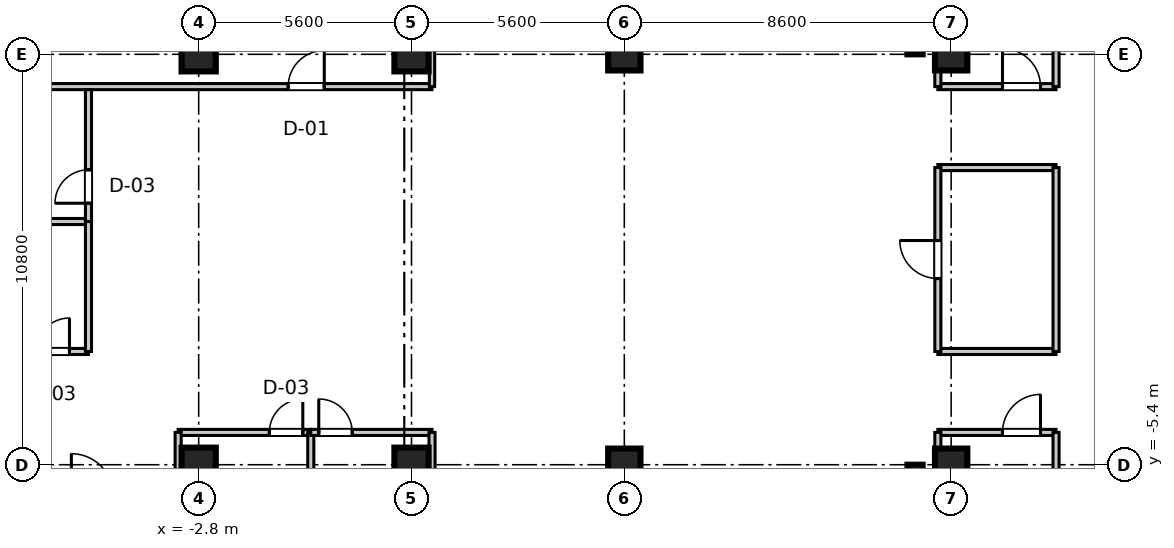
"""IFC4 building model, lengths in metres.
Left out: names, types, materials, properties, quantities, classifications, styles, units other than length and angle.
Written with IfcOpenShell. Run it as: python <this file> out.ifc"""

import sys

from ifc_helpers import new_model, si_unit, direction, frame, frame_2d, origin, origin_2d, place, context, subcontext, project, spatial, rectangle, extrude, source, transform, mapped, element, fill, save


model = new_model("IFC4")
c1 = context("Model", 3, precision=1e-05, world=origin(), true_north=direction((0.0, 1.0)))
c2 = subcontext(c1, "Body", "Model", "MODEL_VIEW")
j1 = project(units=[si_unit("LENGTHUNIT", "METRE"), si_unit("PLANEANGLEUNIT", "RADIAN")], contexts=[c1])
p1 = place(None, origin())
s1 = spatial("IfcSite", under=j1, at=p1, CompositionType="ELEMENT")
p2 = place(p1, origin())
s2 = spatial("IfcBuilding", under=s1, at=p2, CompositionType="ELEMENT")
p3 = place(p2, frame((0.0, 0.0, 281.3)))
s3 = spatial("IfcBuildingStorey", under=s2, at=p3, CompositionType="ELEMENT", Elevation=281.3)
m1 = source(origin(), c2, "Body", "SweptSolid", [
    extrude(rectangle(XDim=0.9, YDim=0.9, at=origin_2d()), origin(), (0.0, 0.0, 1.0), 3.705),
])
for number, where, z_axis, x_axis in (
    (1, (-2.8, -5.4, 0.0), (0.0, 0.0, 1.0), (1.0, 0.0, 0.0)),
    (2, (-2.8, 5.4, 0.0), (0.0, 0.0, 1.0), (1.0, 0.0, 0.0)),
    (3, (2.8, -5.4, 0.0), (0.0, 0.0, 1.0), (1.0, 0.0, 0.0)),
    (4, (2.8, 5.4, 0.0), (0.0, 0.0, 1.0), (1.0, 0.0, 0.0)),
):
    element("IfcColumn", number, at=place(p3, frame(where, z_axis=z_axis, x_axis=x_axis)), inside=s3, PredefinedType="COLUMN", context=c2, shape_type="MappedRepresentation", body=[
        mapped(m1, transform((0.0, 0.0, 0.0), scale=1.0)),
    ])
m2 = source(origin(), c2, "Body", "SweptSolid", [
    extrude(rectangle(XDim=0.85, YDim=0.85, at=origin_2d()), origin(), (0.0, 0.0, 1.0), 3.705),
])
for number, where, z_axis, x_axis in (
    (5, (8.4, -5.4, 0.0), (0.0, 0.0, 1.0), (1.0, 0.0, 0.0)),
    (6, (8.4, 5.4, 0.0), (0.0, 0.0, 1.0), (1.0, 0.0, 0.0)),
    (7, (17.0, -5.4, 0.0), (0.0, 0.0, 1.0), (1.0, 0.0, 0.0)),
    (8, (17.0, 5.4, 0.0), (0.0, 0.0, 1.0), (1.0, 0.0, 0.0)),
):
    element("IfcColumn", number, at=place(p3, frame(where, z_axis=z_axis, x_axis=x_axis)), inside=s3, PredefinedType="PILASTER", context=c2, shape_type="MappedRepresentation", body=[
        mapped(m2, transform((0.0, 0.0, 0.0), scale=1.0)),
    ])
m3 = source(origin(), c2, "Body", "SweptSolid", [
    extrude(rectangle(XDim=11.6, YDim=0.4, at=frame_2d((5.8, 0.0))), origin(), (0.0, 0.0, 1.0), 3.45),
])
for number, where, z_axis, x_axis in (
    (9, (16.05, 5.4, 0.0), (0.0, 0.0, 1.0), (0.0, 1.0, 0.0)),
    (10, (16.05, -17.0, 0.0), (0.0, 0.0, 1.0), (0.0, 1.0, 0.0)),
):
    element("IfcWall", number, at=place(p3, frame(where, z_axis=z_axis, x_axis=x_axis)), inside=s3, PredefinedType="SHEAR", context=c2, shape_type="MappedRepresentation", body=[
        mapped(m3, transform((0.0, 0.0, 0.0), scale=1.0)),
    ])
m4 = source(origin(), c2, "Body", "SweptSolid", [
    extrude(rectangle(XDim=3.11, YDim=0.16, at=frame_2d((1.555, 0.0))), origin(), (0.0, 0.0, 1.0), 2.79),
])
p4 = place(p3, frame((16.65, 4.55, 0.0), z_axis=(0.0, 0.0, 1.0), x_axis=(1.0, 0.0, 0.0)))
e11 = element("IfcWall", 11, at=p4, inside=s3, PredefinedType="PARTITIONING", context=c2, shape_type="MappedRepresentation", body=[
    mapped(m4, transform((0.0, 0.0, 0.0), scale=1.0)),
])
p5 = place(p4, frame((1.701, 0.0, 0.0)))
e12 = element("IfcOpeningElement", 12, at=p5, cuts=e11, PredefinedType="OPENING", context=c2, shape_type="SweptSolid", body=[
    extrude(rectangle(XDim=1.0, YDim=2.1, at=frame_2d((0.5, 1.05))), frame((0.0, 0.09, 0.0), z_axis=(0.0, -1.0, 0.0), x_axis=(1.0, 0.0, 0.0)), (0.0, 0.0, 1.0), 0.18),
])
m5 = source(origin(), c2, "Body", "SweptSolid", [
    extrude(rectangle(XDim=17.95, YDim=0.16, at=frame_2d((8.975, 0.0))), origin(), (0.0, 0.0, 1.0), 2.79),
])
p6 = place(p3, frame((16.65, 4.55, 0.0), z_axis=(0.0, 0.0, 1.0), x_axis=(0.0, 1.0, 0.0)))
e13 = element("IfcWall", 13, at=p6, inside=s3, PredefinedType="PARTITIONING", context=c2, shape_type="MappedRepresentation", body=[
    mapped(m5, transform((0.0, 0.0, 0.0), scale=1.0)),
])
m6 = source(origin(), c2, "Body", "SweptSolid", [
    extrude(rectangle(XDim=16.53, YDim=0.16, at=frame_2d((8.265, 0.0))), origin(), (0.0, 0.0, 1.0), 2.79),
])
p7 = place(p3, frame((19.76, 4.55, 0.0), z_axis=(0.0, 0.0, 1.0), x_axis=(0.0, 1.0, 0.0)))
e14 = element("IfcWall", 14, at=p7, inside=s3, PredefinedType="PARTITIONING", context=c2, shape_type="MappedRepresentation", body=[
    mapped(m6, transform((0.0, 0.0, 0.0), scale=1.0)),
])
p8 = place(p3, frame((16.65, -4.55, 0.0), z_axis=(0.0, 0.0, 1.0), x_axis=(1.0, 0.0, 0.0)))
e15 = element("IfcWall", 15, at=p8, inside=s3, PredefinedType="PARTITIONING", context=c2, shape_type="MappedRepresentation", body=[
    mapped(m4, transform((0.0, 0.0, 0.0), scale=1.0)),
])
p9 = place(p8, frame((1.701, 0.0, 0.0)))
e16 = element("IfcOpeningElement", 16, at=p9, cuts=e15, PredefinedType="OPENING", context=c2, shape_type="SweptSolid", body=[
    extrude(rectangle(XDim=1.0, YDim=2.1, at=frame_2d((0.5, 1.05))), frame((0.0, 0.09, 0.0), z_axis=(0.0, -1.0, 0.0), x_axis=(1.0, 0.0, 0.0)), (0.0, 0.0, 1.0), 0.18),
])
p10 = place(p3, frame((16.65, -22.5, 0.0), z_axis=(0.0, 0.0, 1.0), x_axis=(0.0, 1.0, 0.0)))
e17 = element("IfcWall", 17, at=p10, inside=s3, PredefinedType="PARTITIONING", context=c2, shape_type="MappedRepresentation", body=[
    mapped(m5, transform((0.0, 0.0, 0.0), scale=1.0)),
])
p11 = place(p3, frame((19.76, -21.08, 0.0), z_axis=(0.0, 0.0, 1.0), x_axis=(0.0, 1.0, 0.0)))
e18 = element("IfcWall", 18, at=p11, inside=s3, PredefinedType="PARTITIONING", context=c2, shape_type="MappedRepresentation", body=[
    mapped(m6, transform((0.0, 0.0, 0.0), scale=1.0)),
])
m7 = source(origin(), c2, "Body", "SweptSolid", [
    extrude(rectangle(XDim=23.1, YDim=0.16, at=frame_2d((11.55, 0.0))), origin(), (0.0, 0.0, 1.0), 2.79),
])
p12 = place(p3, frame((-19.76, 4.55, 0.0), z_axis=(0.0, 0.0, 1.0), x_axis=(1.0, 0.0, 0.0)))
e19 = element("IfcWall", 19, at=p12, inside=s3, PredefinedType="PARTITIONING", context=c2, shape_type="MappedRepresentation", body=[
    mapped(m7, transform((0.0, 0.0, 0.0), scale=1.0)),
])
p13 = place(p12, frame((19.315, 0.0, 0.0)))
e20 = element("IfcOpeningElement", 20, at=p13, cuts=e19, PredefinedType="OPENING", context=c2, shape_type="SweptSolid", body=[
    extrude(rectangle(XDim=0.95, YDim=2.1, at=frame_2d((0.475, 1.05))), frame((0.0, 0.09, 0.0), z_axis=(0.0, -1.0, 0.0), x_axis=(1.0, 0.0, 0.0)), (0.0, 0.0, 1.0), 0.18),
])
m8 = source(origin(), c2, "Body", "SweptSolid", [
    extrude(rectangle(XDim=17.95, YDim=0.14, at=frame_2d((8.975, 0.0))), origin(), (0.0, 0.0, 1.0), 2.79),
])
p14 = place(p3, frame((3.34, 4.55, 0.0), z_axis=(0.0, 0.0, 1.0), x_axis=(0.0, 1.0, 0.0)))
e21 = element("IfcWall", 21, at=p14, inside=s3, PredefinedType="PARTITIONING", context=c2, shape_type="MappedRepresentation", body=[
    mapped(m8, transform((0.0, 0.0, 0.0), scale=1.0)),
])
m9 = source(origin(), c2, "Body", "SweptSolid", [
    extrude(rectangle(XDim=3.49, YDim=0.16, at=frame_2d((1.745, 0.0))), origin(), (0.0, 0.0, 1.0), 2.79),
])
p15 = place(p3, frame((-3.34, -4.55, 0.0), z_axis=(0.0, 0.0, 1.0), x_axis=(1.0, 0.0, 0.0)))
e22 = element("IfcWall", 22, at=p15, inside=s3, PredefinedType="PARTITIONING", context=c2, shape_type="MappedRepresentation", body=[
    mapped(m9, transform((0.0, 0.0, 0.0), scale=1.0)),
])
p16 = place(p15, frame((2.4, 0.0, 0.0)))
e23 = element("IfcOpeningElement", 23, at=p16, cuts=e22, PredefinedType="OPENING", context=c2, shape_type="SweptSolid", body=[
    extrude(rectangle(XDim=0.88, YDim=2.1, at=frame_2d((0.44, 1.05))), frame((0.0, 0.09, 0.0), z_axis=(0.0, -1.0, 0.0), x_axis=(1.0, 0.0, 0.0)), (0.0, 0.0, 1.0), 0.18),
])
for number, where, z_axis, x_axis in (
    (24, (-3.34, -22.5, 0.0), (0.0, 0.0, 1.0), (0.0, 1.0, 0.0)),
    (25, (0.15, -22.5, 0.0), (0.0, 0.0, 1.0), (0.0, 1.0, 0.0)),
):
    element("IfcWall", number, at=place(p3, frame(where, z_axis=z_axis, x_axis=x_axis)), inside=s3, PredefinedType="PARTITIONING", context=c2, shape_type="MappedRepresentation", body=[
        mapped(m5, transform((0.0, 0.0, 0.0), scale=1.0)),
    ])
m10 = source(origin(), c2, "Body", "SweptSolid", [
    extrude(rectangle(XDim=3.19, YDim=0.16, at=frame_2d((1.595, 0.0))), origin(), (0.0, 0.0, 1.0), 2.79),
])
p17 = place(p3, frame((0.15, -4.55, 0.0), z_axis=(0.0, 0.0, 1.0), x_axis=(1.0, 0.0, 0.0)))
e26 = element("IfcWall", 26, at=p17, inside=s3, PredefinedType="PARTITIONING", context=c2, shape_type="MappedRepresentation", body=[
    mapped(m10, transform((0.0, 0.0, 0.0), scale=1.0)),
])
p18 = place(p17, frame((0.21, 0.0, 0.0)))
e27 = element("IfcOpeningElement", 27, at=p18, cuts=e26, PredefinedType="OPENING", context=c2, shape_type="SweptSolid", body=[
    extrude(rectangle(XDim=0.88, YDim=2.1, at=frame_2d((0.44, 1.05))), frame((0.0, 0.09, 0.0), z_axis=(0.0, -1.0, 0.0), x_axis=(1.0, 0.0, 0.0)), (0.0, 0.0, 1.0), 0.18),
])
p19 = place(p3, frame((3.34, -22.5, 0.0), z_axis=(0.0, 0.0, 1.0), x_axis=(0.0, 1.0, 0.0)))
e28 = element("IfcWall", 28, at=p19, inside=s3, PredefinedType="PARTITIONING", context=c2, shape_type="MappedRepresentation", body=[
    mapped(m5, transform((0.0, 0.0, 0.0), scale=1.0)),
])
m11 = source(origin(), c2, "Body", "SweptSolid", [
    extrude(rectangle(XDim=4.499, YDim=0.16, at=frame_2d((2.25, 0.0))), origin(), (0.0, 0.0, 1.0), 2.79),
])
p20 = place(p3, frame((-10.199, -2.42, 0.0), z_axis=(0.0, 0.0, 1.0), x_axis=(1.0, 0.0, 0.0)))
e29 = element("IfcWall", 29, at=p20, inside=s3, PredefinedType="PARTITIONING", context=c2, shape_type="MappedRepresentation", body=[
    mapped(m11, transform((0.0, 0.0, 0.0), scale=1.0)),
])
p21 = place(p20, frame((3.119, 0.0, 0.0)))
e30 = element("IfcOpeningElement", 30, at=p21, cuts=e29, PredefinedType="OPENING", context=c2, shape_type="SweptSolid", body=[
    extrude(rectangle(XDim=0.88, YDim=2.1, at=frame_2d((0.44, 1.05))), frame((0.0, 0.09, 0.0), z_axis=(0.0, -1.0, 0.0), x_axis=(1.0, 0.0, 0.0)), (0.0, 0.0, 1.0), 0.18),
])
p22 = place(p3, frame((-10.199, 1.0, 0.0), z_axis=(0.0, 0.0, 1.0), x_axis=(1.0, 0.0, 0.0)))
e31 = element("IfcWall", 31, at=p22, inside=s3, PredefinedType="PARTITIONING", context=c2, shape_type="MappedRepresentation", body=[
    mapped(m11, transform((0.0, 0.0, 0.0), scale=1.0)),
])
m12 = source(origin(), c2, "Body", "SweptSolid", [
    extrude(rectangle(XDim=3.42, YDim=0.16, at=frame_2d((1.71, 0.0))), origin(), (0.0, 0.0, 1.0), 2.79),
])
p23 = place(p3, frame((-5.7, -2.42, 0.0), z_axis=(0.0, 0.0, 1.0), x_axis=(0.0, 1.0, 0.0)))
e32 = element("IfcWall", 32, at=p23, inside=s3, PredefinedType="PARTITIONING", context=c2, shape_type="MappedRepresentation", body=[
    mapped(m12, transform((0.0, 0.0, 0.0), scale=1.0)),
])
m13 = source(origin(), c2, "Body", "SweptSolid", [
    extrude(rectangle(XDim=3.47, YDim=0.16, at=frame_2d((1.735, 0.0))), origin(), (0.0, 0.0, 1.0), 2.79),
])
p24 = place(p3, frame((-5.7, 1.0, 0.0), z_axis=(0.0, 0.0, 1.0), x_axis=(0.0, 1.0, 0.0)))
e33 = element("IfcWall", 33, at=p24, inside=s3, PredefinedType="PARTITIONING", context=c2, shape_type="MappedRepresentation", body=[
    mapped(m13, transform((0.0, 0.0, 0.0), scale=1.0)),
])
p25 = place(p24, frame((0.481, 0.0, 0.0)))
e34 = element("IfcOpeningElement", 34, at=p25, cuts=e33, PredefinedType="OPENING", context=c2, shape_type="SweptSolid", body=[
    extrude(rectangle(XDim=0.88, YDim=2.1, at=frame_2d((0.44, 1.05))), frame((0.0, 0.09, 0.0), z_axis=(0.0, -1.0, 0.0), x_axis=(1.0, 0.0, 0.0)), (0.0, 0.0, 1.0), 0.18),
])
for number, where, z_axis, x_axis in (
    (35, (16.65, -2.42, 0.0), (0.0, 0.0, 1.0), (1.0, 0.0, 0.0)),
    (36, (16.65, 2.42, 0.0), (0.0, 0.0, 1.0), (1.0, 0.0, 0.0)),
):
    element("IfcWall", number, at=place(p3, frame(where, z_axis=z_axis, x_axis=x_axis)), inside=s3, PredefinedType="PARTITIONING", context=c2, shape_type="MappedRepresentation", body=[
        mapped(m4, transform((0.0, 0.0, 0.0), scale=1.0)),
    ])
m14 = source(origin(), c2, "Body", "SweptSolid", [
    extrude(rectangle(XDim=4.84, YDim=0.16, at=frame_2d((2.42, 0.0))), origin(), (0.0, 0.0, 1.0), 2.79),
])
p26 = place(p3, frame((16.65, -2.42, 0.0), z_axis=(0.0, 0.0, 1.0), x_axis=(0.0, 1.0, 0.0)))
e37 = element("IfcWall", 37, at=p26, inside=s3, PredefinedType="PARTITIONING", context=c2, shape_type="MappedRepresentation", body=[
    mapped(m14, transform((0.0, 0.0, 0.0), scale=1.0)),
])
p27 = place(p26, frame((1.92, 0.0, 0.0)))
e38 = element("IfcOpeningElement", 38, at=p27, cuts=e37, PredefinedType="OPENING", context=c2, shape_type="SweptSolid", body=[
    extrude(rectangle(XDim=1.0, YDim=2.1, at=frame_2d((0.5, 1.05))), frame((0.0, 0.09, 0.0), z_axis=(0.0, -1.0, 0.0), x_axis=(1.0, 0.0, 0.0)), (0.0, 0.0, 1.0), 0.18),
])
p28 = place(p3, frame((19.76, -2.42, 0.0), z_axis=(0.0, 0.0, 1.0), x_axis=(0.0, 1.0, 0.0)))
e39 = element("IfcWall", 39, at=p28, inside=s3, PredefinedType="PARTITIONING", context=c2, shape_type="MappedRepresentation", body=[
    mapped(m14, transform((0.0, 0.0, 0.0), scale=1.0)),
])
m15 = source(origin(), c2, "Body", "SweptSolid", [
    extrude(rectangle(XDim=1.0, YDim=2.1, at=frame_2d((0.5, 1.05))), frame((0.0, 0.025, 0.0), z_axis=(0.0, -1.0, 0.0), x_axis=(1.0, 0.0, 0.0)), (0.0, 0.0, 1.0), 0.05),
])
p29 = place(p5, origin())
e40 = element("IfcDoor", 40, at=p29, inside=s3, OperationType="SINGLE_SWING_LEFT", PredefinedType="DOOR", context=c2, shape_type="MappedRepresentation", body=[
    mapped(m15, transform((0.0, 0.0, 0.0), scale=1.0)),
])
fill(e12, e40)
p30 = place(p9, frame((1.0, 0.0, 0.0), z_axis=(0.0, 0.0, 1.0), x_axis=(-1.0, 0.0, 0.0)))
e41 = element("IfcDoor", 41, at=p30, inside=s3, OperationType="SINGLE_SWING_RIGHT", PredefinedType="DOOR", context=c2, shape_type="MappedRepresentation", body=[
    mapped(m15, transform((0.0, 0.0, 0.0), scale=1.0)),
])
fill(e16, e41)
m16 = source(origin(), c2, "Body", "SweptSolid", [
    extrude(rectangle(XDim=0.95, YDim=2.1, at=frame_2d((0.475, 1.05))), frame((0.0, 0.025, 0.0), z_axis=(0.0, -1.0, 0.0), x_axis=(1.0, 0.0, 0.0)), (0.0, 0.0, 1.0), 0.05),
])
p31 = place(p13, origin())
e42 = element("IfcDoor", 42, at=p31, inside=s3, OperationType="SINGLE_SWING_RIGHT", PredefinedType="DOOR", context=c2, shape_type="MappedRepresentation", body=[
    mapped(m16, transform((0.0, 0.0, 0.0), scale=1.0)),
])
fill(e20, e42)
m17 = source(origin(), c2, "Body", "SweptSolid", [
    extrude(rectangle(XDim=0.88, YDim=2.1, at=frame_2d((0.44, 1.05))), frame((0.0, 0.025, 0.0), z_axis=(0.0, -1.0, 0.0), x_axis=(1.0, 0.0, 0.0)), (0.0, 0.0, 1.0), 0.05),
])
p32 = place(p16, frame((0.88, 0.0, 0.0), z_axis=(0.0, 0.0, 1.0), x_axis=(-1.0, 0.0, 0.0)))
e43 = element("IfcDoor", 43, at=p32, inside=s3, OperationType="SINGLE_SWING_RIGHT", PredefinedType="DOOR", context=c2, shape_type="MappedRepresentation", body=[
    mapped(m17, transform((0.0, 0.0, 0.0), scale=1.0)),
])
fill(e23, e43)
p33 = place(p18, frame((0.88, 0.0, 0.0), z_axis=(0.0, 0.0, 1.0), x_axis=(-1.0, 0.0, 0.0)))
e44 = element("IfcDoor", 44, at=p33, inside=s3, OperationType="SINGLE_SWING_LEFT", PredefinedType="DOOR", context=c2, shape_type="MappedRepresentation", body=[
    mapped(m17, transform((0.0, 0.0, 0.0), scale=1.0)),
])
fill(e27, e44)
p34 = place(p21, origin())
e45 = element("IfcDoor", 45, at=p34, inside=s3, OperationType="SINGLE_SWING_RIGHT", PredefinedType="DOOR", context=c2, shape_type="MappedRepresentation", body=[
    mapped(m17, transform((0.0, 0.0, 0.0), scale=1.0)),
])
fill(e30, e45)
p35 = place(p25, origin())
e46 = element("IfcDoor", 46, at=p35, inside=s3, OperationType="SINGLE_SWING_LEFT", PredefinedType="DOOR", context=c2, shape_type="MappedRepresentation", body=[
    mapped(m17, transform((0.0, 0.0, 0.0), scale=1.0)),
])
fill(e34, e46)
p36 = place(p27, frame((1.0, 0.0, 0.0), z_axis=(0.0, 0.0, 1.0), x_axis=(-1.0, 0.0, 0.0)))
e47 = element("IfcDoor", 47, at=p36, inside=s3, OperationType="SINGLE_SWING_RIGHT", PredefinedType="DOOR", context=c2, shape_type="MappedRepresentation", body=[
    mapped(m15, transform((0.0, 0.0, 0.0), scale=1.0)),
])
fill(e38, e47)
save(model, sys.argv[1])
